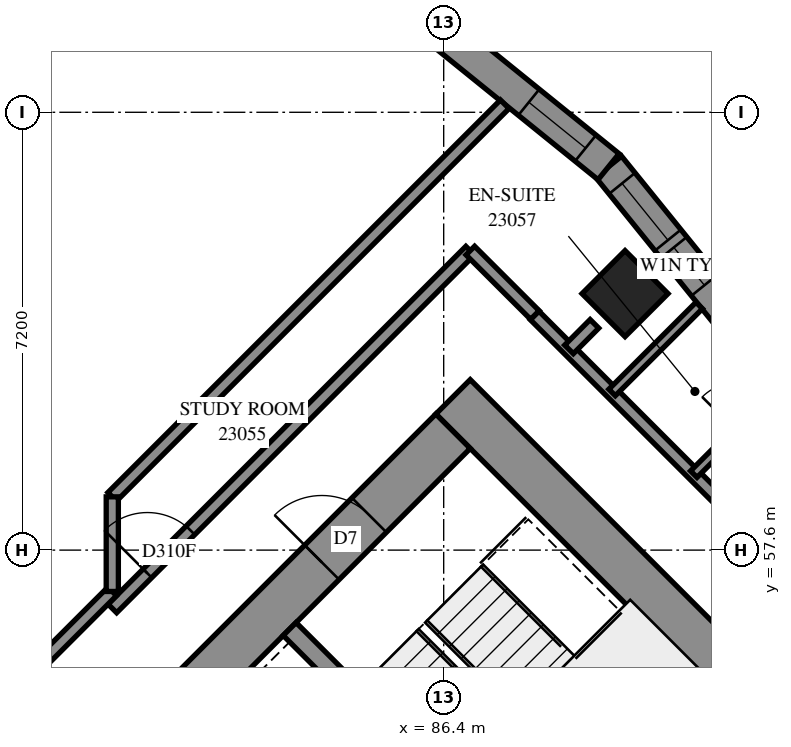
"""IFC4 building model, lengths in metres.
Left out: names, types, materials, properties, quantities, classifications, styles, units other than length and angle.
Written with IfcOpenShell. Run it as: python <this file> out.ifc"""

import sys

from ifc_helpers import new_model, si_unit, direction, frame, frame_2d, origin, origin_2d, place, context, subcontext, project, spatial, polyline, rectangle, outline, extrude, element, fill, save


model = new_model("IFC4")
c1 = context("Model", 3, precision=1e-05, world=origin(), true_north=direction((0.0, 1.0)))
c2 = subcontext(c1, "Body", "Model", "MODEL_VIEW")
j1 = project(units=[si_unit("LENGTHUNIT", "METRE"), si_unit("PLANEANGLEUNIT", "RADIAN")], contexts=[c1])
p1 = place(None, origin())
s1 = spatial("IfcSite", under=j1, at=p1, CompositionType="ELEMENT")
p2 = place(p1, origin())
s2 = spatial("IfcBuilding", under=s1, at=p2, CompositionType="ELEMENT")
p3 = place(p2, frame((0.0, 0.0, 88.0)))
s3 = spatial("IfcBuildingStorey", under=s2, at=p3, CompositionType="ELEMENT", Elevation=88.0)
p4 = place(p3, frame((89.382, 61.818, 0.0), z_axis=(0.0, 0.0, 1.0), x_axis=(0.7071067812, -0.7071067812, 0.0)))
e1 = element("IfcColumn", 1, at=p4, inside=s3, PredefinedType="COLUMN", context=c2, shape_type="SweptSolid", body=[
    extrude(rectangle(XDim=1.0, YDim=1.0, at=origin_2d()), origin(), (0.0, 0.0, 1.0), 3.1),
])
p5 = place(p3, frame((86.554, 60.121, -0.3), z_axis=(0.0, 0.0, 1.0), x_axis=(0.7071067812, -0.7071067812, 0.0)))
e2 = element("IfcWall", 2, at=p5, inside=s3, PredefinedType="SHEAR", context=c2, shape_type="SweptSolid", body=[
    extrude(rectangle(XDim=16.0, YDim=0.8, at=frame_2d((8.0, 0.0))), origin(), (0.0, 0.0, 1.0), 2.7),
])
p6 = place(p5, frame((10.8, 0.0, 0.3)))
e3 = element("IfcOpeningElement", 3, at=p6, cuts=e2, PredefinedType="OPENING", context=c2, shape_type="SweptSolid", body=[
    extrude(rectangle(XDim=0.8, YDim=2.1, at=frame_2d((0.4, 1.05))), frame((0.0, 0.41, 0.0), z_axis=(0.0, -1.0, 0.0), x_axis=(1.0, 0.0, 0.0)), (0.0, 0.0, 1.0), 0.82),
])
p7 = place(p3, frame((76.372, 49.373, -0.3), z_axis=(0.0, 0.0, 1.0), x_axis=(0.7071067812, 0.7071067812, 0.0)))
e4 = element("IfcWall", 4, at=p7, inside=s3, PredefinedType="SHEAR", context=c2, shape_type="SweptSolid", body=[
    extrude(rectangle(XDim=14.4, YDim=0.8, at=frame_2d((7.2, 0.0))), origin(), (0.0, 0.0, 1.0), 2.7),
])
p8 = place(p7, frame((4.55, 0.0, 0.3)))
e5 = element("IfcOpeningElement", 5, at=p8, cuts=e4, PredefinedType="OPENING", context=c2, shape_type="SweptSolid", body=[
    extrude(rectangle(XDim=1.1, YDim=2.1, at=frame_2d((0.55, 1.05))), frame((0.0, 0.41, 0.0), z_axis=(0.0, -1.0, 0.0), x_axis=(1.0, 0.0, 0.0)), (0.0, 0.0, 1.0), 0.82),
])
p9 = place(p7, frame((11.35, 0.0, 0.3)))
e6 = element("IfcOpeningElement", 6, at=p9, cuts=e4, PredefinedType="OPENING", context=c2, shape_type="SweptSolid", body=[
    extrude(rectangle(XDim=1.1, YDim=2.1, at=frame_2d((0.55, 1.05))), frame((0.0, 0.41, 0.0), z_axis=(0.0, -1.0, 0.0), x_axis=(1.0, 0.0, 0.0)), (0.0, 0.0, 1.0), 0.82),
])
p10 = place(p3, frame((83.867, 56.302, 0.0), z_axis=(0.0, 0.0, 1.0), x_axis=(0.7071137256, -0.7070998367, 0.0)))
e7 = element("IfcWall", 7, at=p10, inside=s3, PredefinedType="SOLIDWALL", context=c2, shape_type="SweptSolid", body=[
    extrude(rectangle(XDim=7.2, YDim=0.3, at=frame_2d((3.6, 0.0))), origin(), (0.0, 0.0, 1.0), 3.1),
])
p11 = place(p3, frame((91.265, 61.241, 0.0), z_axis=(0.0, 0.0, 1.0), x_axis=(-0.6286631845, 0.777677697, 0.0)))
e8 = element("IfcWall", 8, at=p11, inside=s3, PredefinedType="SOLIDWALL", context=c2, shape_type="SweptSolid", body=[
    extrude(outline(polyline([(0.029, -0.275), (3.455, -0.275), (3.397, 0.275), (-0.029, 0.275), (0.029, -0.275)])), origin(), (0.0, 0.0, 1.0), 3.1),
])
p12 = place(p11, frame((1.873, 0.0, 0.5)))
e9 = element("IfcOpeningElement", 9, at=p12, cuts=e8, PredefinedType="OPENING", context=c2, shape_type="SweptSolid", body=[
    extrude(rectangle(XDim=1.2, YDim=2.45, at=frame_2d((0.6, 1.225))), frame((0.0, 0.285, 0.0), z_axis=(0.0, -1.0, 0.0), x_axis=(1.0, 0.0, 0.0)), (0.0, 0.0, 1.0), 0.57),
])
p13 = place(p11, frame((0.918, 0.0, 0.45)))
e10 = element("IfcOpeningElement", 10, at=p13, cuts=e8, PredefinedType="OPENING", context=c2, shape_type="SweptSolid", body=[
    extrude(rectangle(XDim=0.8, YDim=2.5, at=frame_2d((0.4, 1.25))), frame((0.0, 0.285, 0.0), z_axis=(0.0, -1.0, 0.0), x_axis=(1.0, 0.0, 0.0)), (0.0, 0.0, 1.0), 0.57),
])
p14 = place(p3, frame((89.111, 63.905, 0.0), z_axis=(0.0, 0.0, 1.0), x_axis=(-0.777677697, 0.6286631845, 0.0)))
e11 = element("IfcWall", 11, at=p14, inside=s3, PredefinedType="SOLIDWALL", context=c2, shape_type="SweptSolid", body=[
    extrude(outline(polyline([(-0.029, -0.275), (3.397, -0.275), (3.455, 0.275), (0.029, 0.275), (-0.029, -0.275)])), origin(), (0.0, 0.0, 1.0), 3.1),
])
p15 = place(p14, frame((0.486, 0.0, 0.5)))
e12 = element("IfcOpeningElement", 12, at=p15, cuts=e11, PredefinedType="OPENING", context=c2, shape_type="SweptSolid", body=[
    extrude(rectangle(XDim=1.2, YDim=2.45, at=frame_2d((0.6, 1.225))), frame((0.0, 0.285, 0.0), z_axis=(0.0, -1.0, 0.0), x_axis=(1.0, 0.0, 0.0)), (0.0, 0.0, 1.0), 0.57),
])
p16 = place(p3, frame((87.894, 61.461, 0.0), z_axis=(0.0, 0.0, 1.0), x_axis=(0.7071067812, -0.7071067812, 0.0)))
e13 = element("IfcWall", 13, at=p16, inside=s3, PredefinedType="PARTITIONING", context=c2, shape_type="SweptSolid", body=[
    extrude(rectangle(XDim=17.5, YDim=0.2, at=frame_2d((8.75, 0.0))), origin(), (0.0, 0.0, 1.0), 3.1),
])
p17 = place(p16, frame((8.735, 0.0, 0.0)))
e14 = element("IfcOpeningElement", 14, at=p17, cuts=e13, PredefinedType="OPENING", context=c2, shape_type="SweptSolid", body=[
    extrude(rectangle(XDim=0.9, YDim=2.1, at=frame_2d((0.45, 1.05))), frame((0.0, 0.11, 0.0), z_axis=(0.0, -1.0, 0.0), x_axis=(1.0, 0.0, 0.0)), (0.0, 0.0, 1.0), 0.22),
])
p18 = place(p3, frame((80.949, 58.477, 0.0), z_axis=(0.0, 0.0, 1.0), x_axis=(0.7071122585, 0.7071013038, 0.0)))
e15 = element("IfcWall", 15, at=p18, inside=s3, PredefinedType="PARTITIONING", context=c2, shape_type="SweptSolid", body=[
    extrude(rectangle(XDim=9.129, YDim=0.2, at=frame_2d((4.564, 0.0))), origin(), (0.0, 0.0, 1.0), 3.1),
])
p19 = place(p3, frame((80.951, 56.641, 0.0), z_axis=(0.0, 0.0, 1.0), x_axis=(0.7071067812, 0.7071067812, 0.0)))
e16 = element("IfcWall", 16, at=p19, inside=s3, PredefinedType="PARTITIONING", context=c2, shape_type="SweptSolid", body=[
    extrude(rectangle(XDim=8.321, YDim=0.2, at=frame_2d((4.161, 0.0))), origin(), (0.0, 0.0, 1.0), 3.1),
])
p20 = place(p19, frame((0.816, 0.0, 0.0)))
e17 = element("IfcOpeningElement", 17, at=p20, cuts=e16, PredefinedType="OPENING", context=c2, shape_type="SweptSolid", body=[
    extrude(rectangle(XDim=1.0, YDim=2.1, at=frame_2d((0.5, 1.05))), frame((0.0, 0.11, 0.0), z_axis=(0.0, -1.0, 0.0), x_axis=(1.0, 0.0, 0.0)), (0.0, 0.0, 1.0), 0.22),
])
p21 = place(p3, frame((90.513, 58.849, 0.0), z_axis=(0.0, 0.0, 1.0), x_axis=(0.7071309413, 0.7070826202, 0.0)))
e18 = element("IfcWall", 18, at=p21, inside=s3, PredefinedType="PARTITIONING", context=c2, shape_type="SweptSolid", body=[
    extrude(rectangle(XDim=2.07, YDim=0.15, at=frame_2d((1.035, 0.0))), origin(), (0.0, 0.0, 1.0), 3.1),
])
p22 = place(p21, frame((0.996, 0.0, 0.0)))
e19 = element("IfcOpeningElement", 19, at=p22, cuts=e18, PredefinedType="OPENING", context=c2, shape_type="SweptSolid", body=[
    extrude(rectangle(XDim=0.8, YDim=2.1, at=frame_2d((0.4, 1.05))), frame((0.0, 0.085, 0.0), z_axis=(0.0, -1.0, 0.0), x_axis=(1.0, 0.0, 0.0)), (0.0, 0.0, 1.0), 0.17),
])
p23 = place(p3, frame((89.169, 60.193, 0.0), z_axis=(0.0, 0.0, 1.0), x_axis=(0.7076498168, 0.7065633282, 0.0)))
e20 = element("IfcWall", 20, at=p23, inside=s3, PredefinedType="PARTITIONING", context=c2, shape_type="SweptSolid", body=[
    extrude(rectangle(XDim=2.025, YDim=0.15, at=frame_2d((1.012, 0.0))), origin(), (0.0, 0.0, 1.0), 3.1),
])
p24 = place(p3, frame((79.801, 55.773, 0.0), z_axis=(0.0, 0.0, 1.0), x_axis=(0.7071067812, 0.7071067812, 0.0)))
e21 = element("IfcWall", 21, at=p24, inside=s3, PredefinedType="PARTITIONING", context=c2, shape_type="SweptSolid", body=[
    extrude(rectangle(XDim=1.623, YDim=0.2, at=frame_2d((0.812, 0.0))), origin(), (0.0, 0.0, 1.0), 3.1),
])
p25 = place(p3, frame((80.95, 56.92, 0.0), z_axis=(0.0, 0.0, 1.0), x_axis=(0.0, 1.0, 0.0)))
e22 = element("IfcWall", 22, at=p25, inside=s3, PredefinedType="PARTITIONING", context=c2, shape_type="SweptSolid", body=[
    extrude(rectangle(XDim=1.556, YDim=0.2, at=frame_2d((0.778, 0.0))), origin(), (0.0, 0.0, 1.0), 3.1),
])
p26 = place(p3, frame((86.838, 62.526, 0.0), z_axis=(0.0, 0.0, 1.0), x_axis=(0.70777292, -0.7064400143, 0.0)))
e23 = element("IfcWall", 23, at=p26, inside=s3, PredefinedType="PARTITIONING", context=c2, shape_type="SweptSolid", body=[
    extrude(rectangle(XDim=1.5, YDim=0.2, at=frame_2d((0.75, 0.0))), origin(), (0.0, 0.0, 1.0), 3.1),
])
p27 = place(p3, frame((88.461, 60.901, 0.0), z_axis=(0.0, 0.0, 1.0), x_axis=(0.7054171665, 0.7087923682, 0.0)))
e24 = element("IfcWall", 24, at=p27, inside=s3, PredefinedType="PARTITIONING", context=c2, shape_type="SweptSolid", body=[
    extrude(rectangle(XDim=0.593, YDim=0.2, at=frame_2d((0.296, 0.0))), origin(), (0.0, 0.0, 1.0), 3.1),
])
p28 = place(p12, origin())
e25 = element("IfcWindow", 25, at=p28, inside=s3, PartitioningType="SINGLE_PANEL", PredefinedType="WINDOW", context=c2, shape_type="SweptSolid", body=[
    extrude(rectangle(XDim=1.2, YDim=2.45, at=frame_2d((0.6, 1.225))), frame((0.0, 0.155, 0.0), z_axis=(0.0, -1.0, 0.0), x_axis=(1.0, 0.0, 0.0)), (0.0, 0.0, 1.0), 0.06),
])
fill(e9, e25)
p29 = place(p15, origin())
e26 = element("IfcWindow", 26, at=p29, inside=s3, PartitioningType="SINGLE_PANEL", PredefinedType="WINDOW", context=c2, shape_type="SweptSolid", body=[
    extrude(rectangle(XDim=1.2, YDim=2.45, at=frame_2d((0.6, 1.225))), frame((0.0, 0.155, 0.0), z_axis=(0.0, -1.0, 0.0), x_axis=(1.0, 0.0, 0.0)), (0.0, 0.0, 1.0), 0.06),
])
fill(e12, e26)
p30 = place(p9, origin())
e27 = element("IfcDoor", 27, at=p30, inside=s3, OperationType="SINGLE_SWING_LEFT", PredefinedType="DOOR", context=c2, shape_type="SweptSolid", body=[
    extrude(rectangle(XDim=1.1, YDim=2.1, at=frame_2d((0.55, 1.05))), frame((0.0, 0.025, 0.0), z_axis=(0.0, -1.0, 0.0), x_axis=(1.0, 0.0, 0.0)), (0.0, 0.0, 1.0), 0.05),
])
fill(e6, e27)
p31 = place(p20, origin())
e28 = element("IfcDoor", 28, at=p31, inside=s3, OperationType="SINGLE_SWING_RIGHT", PredefinedType="DOOR", context=c2, shape_type="SweptSolid", body=[
    extrude(rectangle(XDim=1.0, YDim=2.1, at=frame_2d((0.5, 1.05))), frame((0.0, 0.025, 0.0), z_axis=(0.0, -1.0, 0.0), x_axis=(1.0, 0.0, 0.0)), (0.0, 0.0, 1.0), 0.05),
])
fill(e17, e28)
p32 = place(p13, origin())
e29 = element("IfcWindow", 29, at=p32, inside=s3, PartitioningType="SINGLE_PANEL", PredefinedType="WINDOW", context=c2, shape_type="SweptSolid", body=[
    extrude(rectangle(XDim=0.8, YDim=2.5, at=frame_2d((0.4, 1.25))), frame((0.0, 0.155, 0.0), z_axis=(0.0, -1.0, 0.0), x_axis=(1.0, 0.0, 0.0)), (0.0, 0.0, 1.0), 0.06),
])
fill(e10, e29)
save(model, sys.argv[1])
